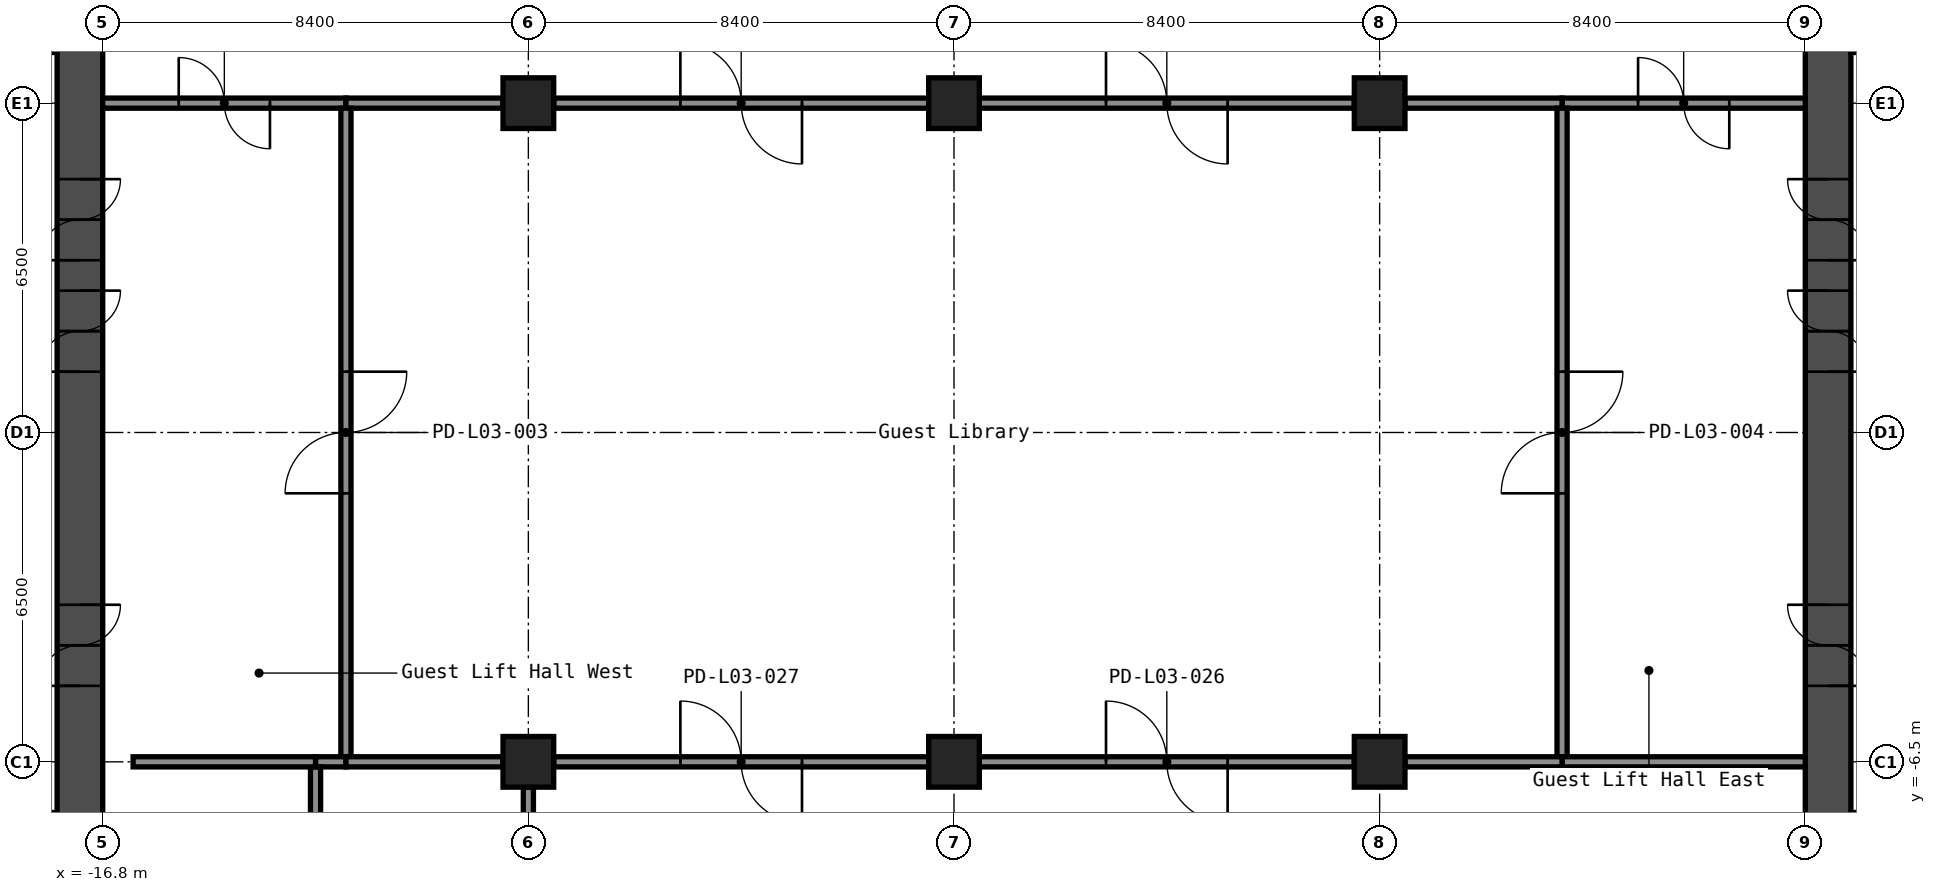
"""IFC4 building model, lengths in metres.
Left out: names, types, materials, properties, quantities, classifications, styles, units other than length and angle.
Written with IfcOpenShell. Run it as: python <this file> out.ifc"""

import sys

from ifc_helpers import new_model, si_unit, direction, frame, frame_2d, origin, origin_2d, place, context, subcontext, project, spatial, rectangle, hollow_rectangle, extrude, element, fill, save


model = new_model("IFC4")
c1 = context("Model", 3, precision=1e-05, world=origin(), true_north=direction((0.0, 1.0)))
c2 = subcontext(c1, "Body", "Model", "MODEL_VIEW")
j1 = project(units=[si_unit("LENGTHUNIT", "METRE"), si_unit("PLANEANGLEUNIT", "RADIAN")], contexts=[c1])
p1 = place(None, origin())
s1 = spatial("IfcSite", under=j1, at=p1, CompositionType="ELEMENT")
p2 = place(p1, origin())
s2 = spatial("IfcBuilding", under=s1, at=p2, CompositionType="ELEMENT")
p3 = place(p2, frame((0.0, 0.0, 15.0)))
s3 = spatial("IfcBuildingStorey", under=s2, at=p3, CompositionType="ELEMENT", Elevation=15.0)
for number, where, z_axis, x_axis in (
    (1, (-8.4, -6.5, 0.0), (0.0, 0.0, 1.0), (1.0, 0.0, 0.0)),
    (2, (-8.4, 6.5, 0.0), (0.0, 0.0, 1.0), (1.0, 0.0, 0.0)),
    (3, (0.0, -6.5, 0.0), (0.0, 0.0, 1.0), (1.0, 0.0, 0.0)),
    (4, (0.0, 6.5, 0.0), (0.0, 0.0, 1.0), (1.0, 0.0, 0.0)),
    (5, (8.4, -6.5, 0.0), (0.0, 0.0, 1.0), (1.0, 0.0, 0.0)),
    (6, (8.4, 6.5, 0.0), (0.0, 0.0, 1.0), (1.0, 0.0, 0.0)),
):
    element("IfcColumn", number, at=place(p3, frame(where, z_axis=z_axis, x_axis=x_axis)), inside=s3, PredefinedType="COLUMN", context=c2, shape_type="SweptSolid", body=[
        extrude(hollow_rectangle(XDim=1.0, YDim=1.0, WallThickness=0.04, at=origin_2d()), origin(), (0.0, 0.0, 1.0), 4.4),
    ])
p4 = place(p3, frame((-17.25, -8.4, 0.0), z_axis=(0.0, 0.0, 1.0), x_axis=(0.0, 1.0, 0.0)))
e7 = element("IfcWall", 7, at=p4, inside=s3, PredefinedType="SHEAR", context=c2, shape_type="SweptSolid", body=[
    extrude(rectangle(XDim=16.8, YDim=0.9, at=frame_2d((8.4, 0.0))), origin(), (0.0, 0.0, 1.0), 4.4),
])
p5 = place(p4, frame((3.4, 0.0, 0.0)))
e8 = element("IfcOpeningElement", 8, at=p5, cuts=e7, PredefinedType="OPENING", context=c2, shape_type="SweptSolid", body=[
    extrude(rectangle(XDim=1.6, YDim=2.1, at=frame_2d((0.8, 1.05))), frame((0.0, 0.46, 0.0), z_axis=(0.0, -1.0, 0.0), x_axis=(1.0, 0.0, 0.0)), (0.0, 0.0, 1.0), 0.92),
])
p6 = place(p4, frame((9.6, 0.0, 0.0)))
e9 = element("IfcOpeningElement", 9, at=p6, cuts=e7, PredefinedType="OPENING", context=c2, shape_type="SweptSolid", body=[
    extrude(rectangle(XDim=1.6, YDim=2.1, at=frame_2d((0.8, 1.05))), frame((0.0, 0.46, 0.0), z_axis=(0.0, -1.0, 0.0), x_axis=(1.0, 0.0, 0.0)), (0.0, 0.0, 1.0), 0.92),
])
p7 = place(p4, frame((11.8, 0.0, 0.0)))
e10 = element("IfcOpeningElement", 10, at=p7, cuts=e7, PredefinedType="OPENING", context=c2, shape_type="SweptSolid", body=[
    extrude(rectangle(XDim=1.6, YDim=2.1, at=frame_2d((0.8, 1.05))), frame((0.0, 0.46, 0.0), z_axis=(0.0, -1.0, 0.0), x_axis=(1.0, 0.0, 0.0)), (0.0, 0.0, 1.0), 0.92),
])
p8 = place(p3, frame((17.25, -8.4, 0.0), z_axis=(0.0, 0.0, 1.0), x_axis=(0.0, 1.0, 0.0)))
e11 = element("IfcWall", 11, at=p8, inside=s3, PredefinedType="SHEAR", context=c2, shape_type="SweptSolid", body=[
    extrude(rectangle(XDim=16.8, YDim=0.9, at=frame_2d((8.4, 0.0))), origin(), (0.0, 0.0, 1.0), 4.4),
])
p9 = place(p8, frame((3.4, 0.0, 0.0)))
e12 = element("IfcOpeningElement", 12, at=p9, cuts=e11, PredefinedType="OPENING", context=c2, shape_type="SweptSolid", body=[
    extrude(rectangle(XDim=1.6, YDim=2.1, at=frame_2d((0.8, 1.05))), frame((0.0, 0.46, 0.0), z_axis=(0.0, -1.0, 0.0), x_axis=(1.0, 0.0, 0.0)), (0.0, 0.0, 1.0), 0.92),
])
p10 = place(p8, frame((9.6, 0.0, 0.0)))
e13 = element("IfcOpeningElement", 13, at=p10, cuts=e11, PredefinedType="OPENING", context=c2, shape_type="SweptSolid", body=[
    extrude(rectangle(XDim=1.6, YDim=2.1, at=frame_2d((0.8, 1.05))), frame((0.0, 0.46, 0.0), z_axis=(0.0, -1.0, 0.0), x_axis=(1.0, 0.0, 0.0)), (0.0, 0.0, 1.0), 0.92),
])
p11 = place(p8, frame((11.8, 0.0, 0.0)))
e14 = element("IfcOpeningElement", 14, at=p11, cuts=e11, PredefinedType="OPENING", context=c2, shape_type="SweptSolid", body=[
    extrude(rectangle(XDim=1.6, YDim=2.1, at=frame_2d((0.8, 1.05))), frame((0.0, 0.46, 0.0), z_axis=(0.0, -1.0, 0.0), x_axis=(1.0, 0.0, 0.0)), (0.0, 0.0, 1.0), 0.92),
])
p12 = place(p3, frame((16.8, 6.5, 0.0), z_axis=(0.0, 0.0, 1.0), x_axis=(-1.0, 0.0, 0.0)))
e15 = element("IfcWall", 15, at=p12, inside=s3, PredefinedType="PARTITIONING", context=c2, shape_type="SweptSolid", body=[
    extrude(rectangle(XDim=4.8, YDim=0.2, at=frame_2d((2.4, 0.0))), origin(), (0.0, 0.0, 1.0), 4.4),
])
p13 = place(p12, frame((1.5, 0.0, 0.0)))
e16 = element("IfcOpeningElement", 16, at=p13, cuts=e15, PredefinedType="OPENING", context=c2, shape_type="SweptSolid", body=[
    extrude(rectangle(XDim=1.8, YDim=2.1, at=frame_2d((0.9, 1.05))), frame((0.0, 0.11, 0.0), z_axis=(0.0, -1.0, 0.0), x_axis=(1.0, 0.0, 0.0)), (0.0, 0.0, 1.0), 0.22),
])
p14 = place(p3, frame((-12.0, 6.5, 0.0), z_axis=(0.0, 0.0, 1.0), x_axis=(-1.0, 0.0, 0.0)))
e17 = element("IfcWall", 17, at=p14, inside=s3, PredefinedType="PARTITIONING", context=c2, shape_type="SweptSolid", body=[
    extrude(rectangle(XDim=4.8, YDim=0.2, at=frame_2d((2.4, 0.0))), origin(), (0.0, 0.0, 1.0), 4.4),
])
p15 = place(p14, frame((1.5, 0.0, 0.0)))
e18 = element("IfcOpeningElement", 18, at=p15, cuts=e17, PredefinedType="OPENING", context=c2, shape_type="SweptSolid", body=[
    extrude(rectangle(XDim=1.8, YDim=2.1, at=frame_2d((0.9, 1.05))), frame((0.0, 0.11, 0.0), z_axis=(0.0, -1.0, 0.0), x_axis=(1.0, 0.0, 0.0)), (0.0, 0.0, 1.0), 0.22),
])
p16 = place(p3, frame((12.0, 6.5, 0.0), z_axis=(0.0, 0.0, 1.0), x_axis=(-1.0, 0.0, 0.0)))
e19 = element("IfcWall", 19, at=p16, inside=s3, PredefinedType="PARTITIONING", context=c2, shape_type="SweptSolid", body=[
    extrude(rectangle(XDim=3.1, YDim=0.2, at=frame_2d((1.55, 0.0))), origin(), (0.0, 0.0, 1.0), 4.4),
])
p17 = place(p3, frame((7.9, 6.5, 0.0), z_axis=(0.0, 0.0, 1.0), x_axis=(-1.0, 0.0, 0.0)))
e20 = element("IfcWall", 20, at=p17, inside=s3, PredefinedType="PARTITIONING", context=c2, shape_type="SweptSolid", body=[
    extrude(rectangle(XDim=7.4, YDim=0.2, at=frame_2d((3.7, 0.0))), origin(), (0.0, 0.0, 1.0), 4.4),
])
p18 = place(p17, frame((2.5, 0.0, 0.0)))
e21 = element("IfcOpeningElement", 21, at=p18, cuts=e20, PredefinedType="OPENING", context=c2, shape_type="SweptSolid", body=[
    extrude(rectangle(XDim=2.4, YDim=2.1, at=frame_2d((1.2, 1.05))), frame((0.0, 0.11, 0.0), z_axis=(0.0, -1.0, 0.0), x_axis=(1.0, 0.0, 0.0)), (0.0, 0.0, 1.0), 0.22),
])
p19 = place(p3, frame((-0.5, 6.5, 0.0), z_axis=(0.0, 0.0, 1.0), x_axis=(-1.0, 0.0, 0.0)))
e22 = element("IfcWall", 22, at=p19, inside=s3, PredefinedType="PARTITIONING", context=c2, shape_type="SweptSolid", body=[
    extrude(rectangle(XDim=7.4, YDim=0.2, at=frame_2d((3.7, 0.0))), origin(), (0.0, 0.0, 1.0), 4.4),
])
p20 = place(p19, frame((2.5, 0.0, 0.0)))
e23 = element("IfcOpeningElement", 23, at=p20, cuts=e22, PredefinedType="OPENING", context=c2, shape_type="SweptSolid", body=[
    extrude(rectangle(XDim=2.4, YDim=2.1, at=frame_2d((1.2, 1.05))), frame((0.0, 0.11, 0.0), z_axis=(0.0, -1.0, 0.0), x_axis=(1.0, 0.0, 0.0)), (0.0, 0.0, 1.0), 0.22),
])
p21 = place(p3, frame((-8.9, 6.5, 0.0), z_axis=(0.0, 0.0, 1.0), x_axis=(-1.0, 0.0, 0.0)))
e24 = element("IfcWall", 24, at=p21, inside=s3, PredefinedType="PARTITIONING", context=c2, shape_type="SweptSolid", body=[
    extrude(rectangle(XDim=3.1, YDim=0.2, at=frame_2d((1.55, 0.0))), origin(), (0.0, 0.0, 1.0), 4.4),
])
p22 = place(p3, frame((12.0, -6.4, 0.0), z_axis=(0.0, 0.0, 1.0), x_axis=(0.0, 1.0, 0.0)))
e25 = element("IfcWall", 25, at=p22, inside=s3, PredefinedType="PARTITIONING", context=c2, shape_type="SweptSolid", body=[
    extrude(rectangle(XDim=12.8, YDim=0.2, at=frame_2d((6.4, 0.0))), origin(), (0.0, 0.0, 1.0), 4.4),
])
p23 = place(p22, frame((5.2, 0.0, 0.0)))
e26 = element("IfcOpeningElement", 26, at=p23, cuts=e25, PredefinedType="OPENING", context=c2, shape_type="SweptSolid", body=[
    extrude(rectangle(XDim=2.4, YDim=2.1, at=frame_2d((1.2, 1.05))), frame((0.0, 0.11, 0.0), z_axis=(0.0, -1.0, 0.0), x_axis=(1.0, 0.0, 0.0)), (0.0, 0.0, 1.0), 0.22),
])
p24 = place(p3, frame((16.8, -6.5, 0.0), z_axis=(0.0, 0.0, 1.0), x_axis=(-1.0, 0.0, 0.0)))
e27 = element("IfcWall", 27, at=p24, inside=s3, PredefinedType="PARTITIONING", context=c2, shape_type="SweptSolid", body=[
    extrude(rectangle(XDim=4.8, YDim=0.2, at=frame_2d((2.4, 0.0))), origin(), (0.0, 0.0, 1.0), 4.4),
])
p25 = place(p3, frame((-12.0, 6.4, 0.0), z_axis=(0.0, 0.0, 1.0), x_axis=(0.0, -1.0, 0.0)))
e28 = element("IfcWall", 28, at=p25, inside=s3, PredefinedType="PARTITIONING", context=c2, shape_type="SweptSolid", body=[
    extrude(rectangle(XDim=12.8, YDim=0.2, at=frame_2d((6.4, 0.0))), origin(), (0.0, 0.0, 1.0), 4.4),
])
p26 = place(p25, frame((5.2, 0.0, 0.0)))
e29 = element("IfcOpeningElement", 29, at=p26, cuts=e28, PredefinedType="OPENING", context=c2, shape_type="SweptSolid", body=[
    extrude(rectangle(XDim=2.4, YDim=2.1, at=frame_2d((1.2, 1.05))), frame((0.0, 0.11, 0.0), z_axis=(0.0, -1.0, 0.0), x_axis=(1.0, 0.0, 0.0)), (0.0, 0.0, 1.0), 0.22),
])
p27 = place(p3, frame((12.0, -6.5, 0.0), z_axis=(0.0, 0.0, 1.0), x_axis=(-1.0, 0.0, 0.0)))
e30 = element("IfcWall", 30, at=p27, inside=s3, PredefinedType="PARTITIONING", context=c2, shape_type="SweptSolid", body=[
    extrude(rectangle(XDim=3.1, YDim=0.2, at=frame_2d((1.55, 0.0))), origin(), (0.0, 0.0, 1.0), 4.4),
])
p28 = place(p3, frame((7.9, -6.5, 0.0), z_axis=(0.0, 0.0, 1.0), x_axis=(-1.0, 0.0, 0.0)))
e31 = element("IfcWall", 31, at=p28, inside=s3, PredefinedType="PARTITIONING", context=c2, shape_type="SweptSolid", body=[
    extrude(rectangle(XDim=7.4, YDim=0.2, at=frame_2d((3.7, 0.0))), origin(), (0.0, 0.0, 1.0), 4.4),
])
p29 = place(p28, frame((2.5, 0.0, 0.0)))
e32 = element("IfcOpeningElement", 32, at=p29, cuts=e31, PredefinedType="OPENING", context=c2, shape_type="SweptSolid", body=[
    extrude(rectangle(XDim=2.4, YDim=2.1, at=frame_2d((1.2, 1.05))), frame((0.0, 0.11, 0.0), z_axis=(0.0, -1.0, 0.0), x_axis=(1.0, 0.0, 0.0)), (0.0, 0.0, 1.0), 0.22),
])
p30 = place(p3, frame((-0.5, -6.5, 0.0), z_axis=(0.0, 0.0, 1.0), x_axis=(-1.0, 0.0, 0.0)))
e33 = element("IfcWall", 33, at=p30, inside=s3, PredefinedType="PARTITIONING", context=c2, shape_type="SweptSolid", body=[
    extrude(rectangle(XDim=7.4, YDim=0.2, at=frame_2d((3.7, 0.0))), origin(), (0.0, 0.0, 1.0), 4.4),
])
p31 = place(p30, frame((2.5, 0.0, 0.0)))
e34 = element("IfcOpeningElement", 34, at=p31, cuts=e33, PredefinedType="OPENING", context=c2, shape_type="SweptSolid", body=[
    extrude(rectangle(XDim=2.4, YDim=2.1, at=frame_2d((1.2, 1.05))), frame((0.0, 0.11, 0.0), z_axis=(0.0, -1.0, 0.0), x_axis=(1.0, 0.0, 0.0)), (0.0, 0.0, 1.0), 0.22),
])
p32 = place(p3, frame((-12.6, -6.5, 0.0), z_axis=(0.0, 0.0, 1.0), x_axis=(1.0, 0.0, 0.0)))
e35 = element("IfcWall", 35, at=p32, inside=s3, PredefinedType="PARTITIONING", context=c2, shape_type="SweptSolid", body=[
    extrude(rectangle(XDim=0.6, YDim=0.2, at=frame_2d((0.3, 0.0))), origin(), (0.0, 0.0, 1.0), 4.4),
])
p33 = place(p3, frame((-12.0, -6.5, 0.0), z_axis=(0.0, 0.0, 1.0), x_axis=(1.0, 0.0, 0.0)))
e36 = element("IfcWall", 36, at=p33, inside=s3, PredefinedType="PARTITIONING", context=c2, shape_type="SweptSolid", body=[
    extrude(rectangle(XDim=3.1, YDim=0.2, at=frame_2d((1.55, 0.0))), origin(), (0.0, 0.0, 1.0), 4.4),
])
p34 = place(p3, frame((-8.4, -7.0, 0.0), z_axis=(0.0, 0.0, 1.0), x_axis=(0.0, -1.0, 0.0)))
e37 = element("IfcWall", 37, at=p34, inside=s3, PredefinedType="PARTITIONING", context=c2, shape_type="SweptSolid", body=[
    extrude(rectangle(XDim=6.6, YDim=0.2, at=frame_2d((3.3, 0.0))), origin(), (0.0, 0.0, 1.0), 4.4),
])
p35 = place(p34, frame((2.4, 0.0, 0.0)))
e38 = element("IfcOpeningElement", 38, at=p35, cuts=e37, PredefinedType="OPENING", context=c2, shape_type="SweptSolid", body=[
    extrude(rectangle(XDim=1.2, YDim=2.1, at=frame_2d((0.6, 1.05))), frame((0.0, 0.11, 0.0), z_axis=(0.0, -1.0, 0.0), x_axis=(1.0, 0.0, 0.0)), (0.0, 0.0, 1.0), 0.22),
])
p36 = place(p3, frame((-12.6, -11.5, 0.0), z_axis=(0.0, 0.0, 1.0), x_axis=(0.0, 1.0, 0.0)))
e39 = element("IfcWall", 39, at=p36, inside=s3, PredefinedType="PARTITIONING", context=c2, shape_type="SweptSolid", body=[
    extrude(rectangle(XDim=4.9, YDim=0.2, at=frame_2d((2.45, 0.0))), origin(), (0.0, 0.0, 1.0), 4.4),
])
p37 = place(p36, frame((2.0, 0.0, 0.0)))
e40 = element("IfcOpeningElement", 40, at=p37, cuts=e39, PredefinedType="OPENING", context=c2, shape_type="SweptSolid", body=[
    extrude(rectangle(XDim=1.0, YDim=2.1, at=frame_2d((0.5, 1.05))), frame((0.0, 0.11, 0.0), z_axis=(0.0, -1.0, 0.0), x_axis=(1.0, 0.0, 0.0)), (0.0, 0.0, 1.0), 0.22),
])
p38 = place(p3, frame((-16.2, -6.5, 0.0), z_axis=(0.0, 0.0, 1.0), x_axis=(1.0, 0.0, 0.0)))
e41 = element("IfcWall", 41, at=p38, inside=s3, PredefinedType="PARTITIONING", context=c2, shape_type="SweptSolid", body=[
    extrude(rectangle(XDim=3.6, YDim=0.2, at=frame_2d((1.8, 0.0))), origin(), (0.0, 0.0, 1.0), 4.4),
])
p39 = place(p5, origin())
e42 = element("IfcDoor", 42, at=p39, inside=s3, OperationType="DOUBLE_DOOR_SINGLE_SWING", PredefinedType="DOOR", context=c2, shape_type="SweptSolid", body=[
    extrude(rectangle(XDim=1.6, YDim=2.1, at=frame_2d((0.8, 1.05))), frame((0.0, 0.025, 0.0), z_axis=(0.0, -1.0, 0.0), x_axis=(1.0, 0.0, 0.0)), (0.0, 0.0, 1.0), 0.05),
])
fill(e8, e42)
p40 = place(p6, origin())
e43 = element("IfcDoor", 43, at=p40, inside=s3, OperationType="DOUBLE_DOOR_SINGLE_SWING", PredefinedType="DOOR", context=c2, shape_type="SweptSolid", body=[
    extrude(rectangle(XDim=1.6, YDim=2.1, at=frame_2d((0.8, 1.05))), frame((0.0, 0.025, 0.0), z_axis=(0.0, -1.0, 0.0), x_axis=(1.0, 0.0, 0.0)), (0.0, 0.0, 1.0), 0.05),
])
fill(e9, e43)
p41 = place(p7, origin())
e44 = element("IfcDoor", 44, at=p41, inside=s3, OperationType="DOUBLE_DOOR_SINGLE_SWING", PredefinedType="DOOR", context=c2, shape_type="SweptSolid", body=[
    extrude(rectangle(XDim=1.6, YDim=2.1, at=frame_2d((0.8, 1.05))), frame((0.0, 0.025, 0.0), z_axis=(0.0, -1.0, 0.0), x_axis=(1.0, 0.0, 0.0)), (0.0, 0.0, 1.0), 0.05),
])
fill(e10, e44)
p42 = place(p9, origin())
e45 = element("IfcDoor", 45, at=p42, inside=s3, OperationType="DOUBLE_DOOR_SINGLE_SWING", PredefinedType="DOOR", context=c2, shape_type="SweptSolid", body=[
    extrude(rectangle(XDim=1.6, YDim=2.1, at=frame_2d((0.8, 1.05))), frame((0.0, 0.025, 0.0), z_axis=(0.0, -1.0, 0.0), x_axis=(1.0, 0.0, 0.0)), (0.0, 0.0, 1.0), 0.05),
])
fill(e12, e45)
p43 = place(p10, origin())
e46 = element("IfcDoor", 46, at=p43, inside=s3, OperationType="DOUBLE_DOOR_SINGLE_SWING", PredefinedType="DOOR", context=c2, shape_type="SweptSolid", body=[
    extrude(rectangle(XDim=1.6, YDim=2.1, at=frame_2d((0.8, 1.05))), frame((0.0, 0.025, 0.0), z_axis=(0.0, -1.0, 0.0), x_axis=(1.0, 0.0, 0.0)), (0.0, 0.0, 1.0), 0.05),
])
fill(e13, e46)
p44 = place(p11, origin())
e47 = element("IfcDoor", 47, at=p44, inside=s3, OperationType="DOUBLE_DOOR_SINGLE_SWING", PredefinedType="DOOR", context=c2, shape_type="SweptSolid", body=[
    extrude(rectangle(XDim=1.6, YDim=2.1, at=frame_2d((0.8, 1.05))), frame((0.0, 0.025, 0.0), z_axis=(0.0, -1.0, 0.0), x_axis=(1.0, 0.0, 0.0)), (0.0, 0.0, 1.0), 0.05),
])
fill(e14, e47)
p45 = place(p20, origin())
e48 = element("IfcDoor", 48, at=p45, inside=s3, OperationType="DOUBLE_DOOR_DOUBLE_SWING", PredefinedType="DOOR", context=c2, shape_type="SweptSolid", body=[
    extrude(rectangle(XDim=2.4, YDim=2.1, at=frame_2d((1.2, 1.05))), frame((0.0, 0.025, 0.0), z_axis=(0.0, -1.0, 0.0), x_axis=(1.0, 0.0, 0.0)), (0.0, 0.0, 1.0), 0.05),
])
fill(e23, e48)
p46 = place(p18, origin())
e49 = element("IfcDoor", 49, at=p46, inside=s3, OperationType="DOUBLE_DOOR_DOUBLE_SWING", PredefinedType="DOOR", context=c2, shape_type="SweptSolid", body=[
    extrude(rectangle(XDim=2.4, YDim=2.1, at=frame_2d((1.2, 1.05))), frame((0.0, 0.025, 0.0), z_axis=(0.0, -1.0, 0.0), x_axis=(1.0, 0.0, 0.0)), (0.0, 0.0, 1.0), 0.05),
])
fill(e21, e49)
p47 = place(p26, origin())
e50 = element("IfcDoor", 50, at=p47, inside=s3, OperationType="DOUBLE_DOOR_DOUBLE_SWING", PredefinedType="DOOR", context=c2, shape_type="SweptSolid", body=[
    extrude(rectangle(XDim=2.4, YDim=2.1, at=frame_2d((1.2, 1.05))), frame((0.0, 0.025, 0.0), z_axis=(0.0, -1.0, 0.0), x_axis=(1.0, 0.0, 0.0)), (0.0, 0.0, 1.0), 0.05),
])
fill(e29, e50)
p48 = place(p23, origin())
e51 = element("IfcDoor", 51, at=p48, inside=s3, OperationType="DOUBLE_DOOR_DOUBLE_SWING", PredefinedType="DOOR", context=c2, shape_type="SweptSolid", body=[
    extrude(rectangle(XDim=2.4, YDim=2.1, at=frame_2d((1.2, 1.05))), frame((0.0, 0.025, 0.0), z_axis=(0.0, -1.0, 0.0), x_axis=(1.0, 0.0, 0.0)), (0.0, 0.0, 1.0), 0.05),
])
fill(e26, e51)
p49 = place(p15, origin())
e52 = element("IfcDoor", 52, at=p49, inside=s3, OperationType="DOUBLE_DOOR_DOUBLE_SWING", PredefinedType="DOOR", context=c2, shape_type="SweptSolid", body=[
    extrude(rectangle(XDim=1.8, YDim=2.1, at=frame_2d((0.9, 1.05))), frame((0.0, 0.025, 0.0), z_axis=(0.0, -1.0, 0.0), x_axis=(1.0, 0.0, 0.0)), (0.0, 0.0, 1.0), 0.05),
])
fill(e18, e52)
p50 = place(p13, origin())
e53 = element("IfcDoor", 53, at=p50, inside=s3, OperationType="DOUBLE_DOOR_DOUBLE_SWING", PredefinedType="DOOR", context=c2, shape_type="SweptSolid", body=[
    extrude(rectangle(XDim=1.8, YDim=2.1, at=frame_2d((0.9, 1.05))), frame((0.0, 0.025, 0.0), z_axis=(0.0, -1.0, 0.0), x_axis=(1.0, 0.0, 0.0)), (0.0, 0.0, 1.0), 0.05),
])
fill(e16, e53)
p51 = place(p29, origin())
e54 = element("IfcDoor", 54, at=p51, inside=s3, OperationType="DOUBLE_DOOR_DOUBLE_SWING", PredefinedType="DOOR", context=c2, shape_type="SweptSolid", body=[
    extrude(rectangle(XDim=2.4, YDim=2.1, at=frame_2d((1.2, 1.05))), frame((0.0, 0.025, 0.0), z_axis=(0.0, -1.0, 0.0), x_axis=(1.0, 0.0, 0.0)), (0.0, 0.0, 1.0), 0.05),
])
fill(e32, e54)
p52 = place(p31, origin())
e55 = element("IfcDoor", 55, at=p52, inside=s3, OperationType="DOUBLE_DOOR_DOUBLE_SWING", PredefinedType="DOOR", context=c2, shape_type="SweptSolid", body=[
    extrude(rectangle(XDim=2.4, YDim=2.1, at=frame_2d((1.2, 1.05))), frame((0.0, 0.025, 0.0), z_axis=(0.0, -1.0, 0.0), x_axis=(1.0, 0.0, 0.0)), (0.0, 0.0, 1.0), 0.05),
])
fill(e34, e55)
save(model, sys.argv[1])
